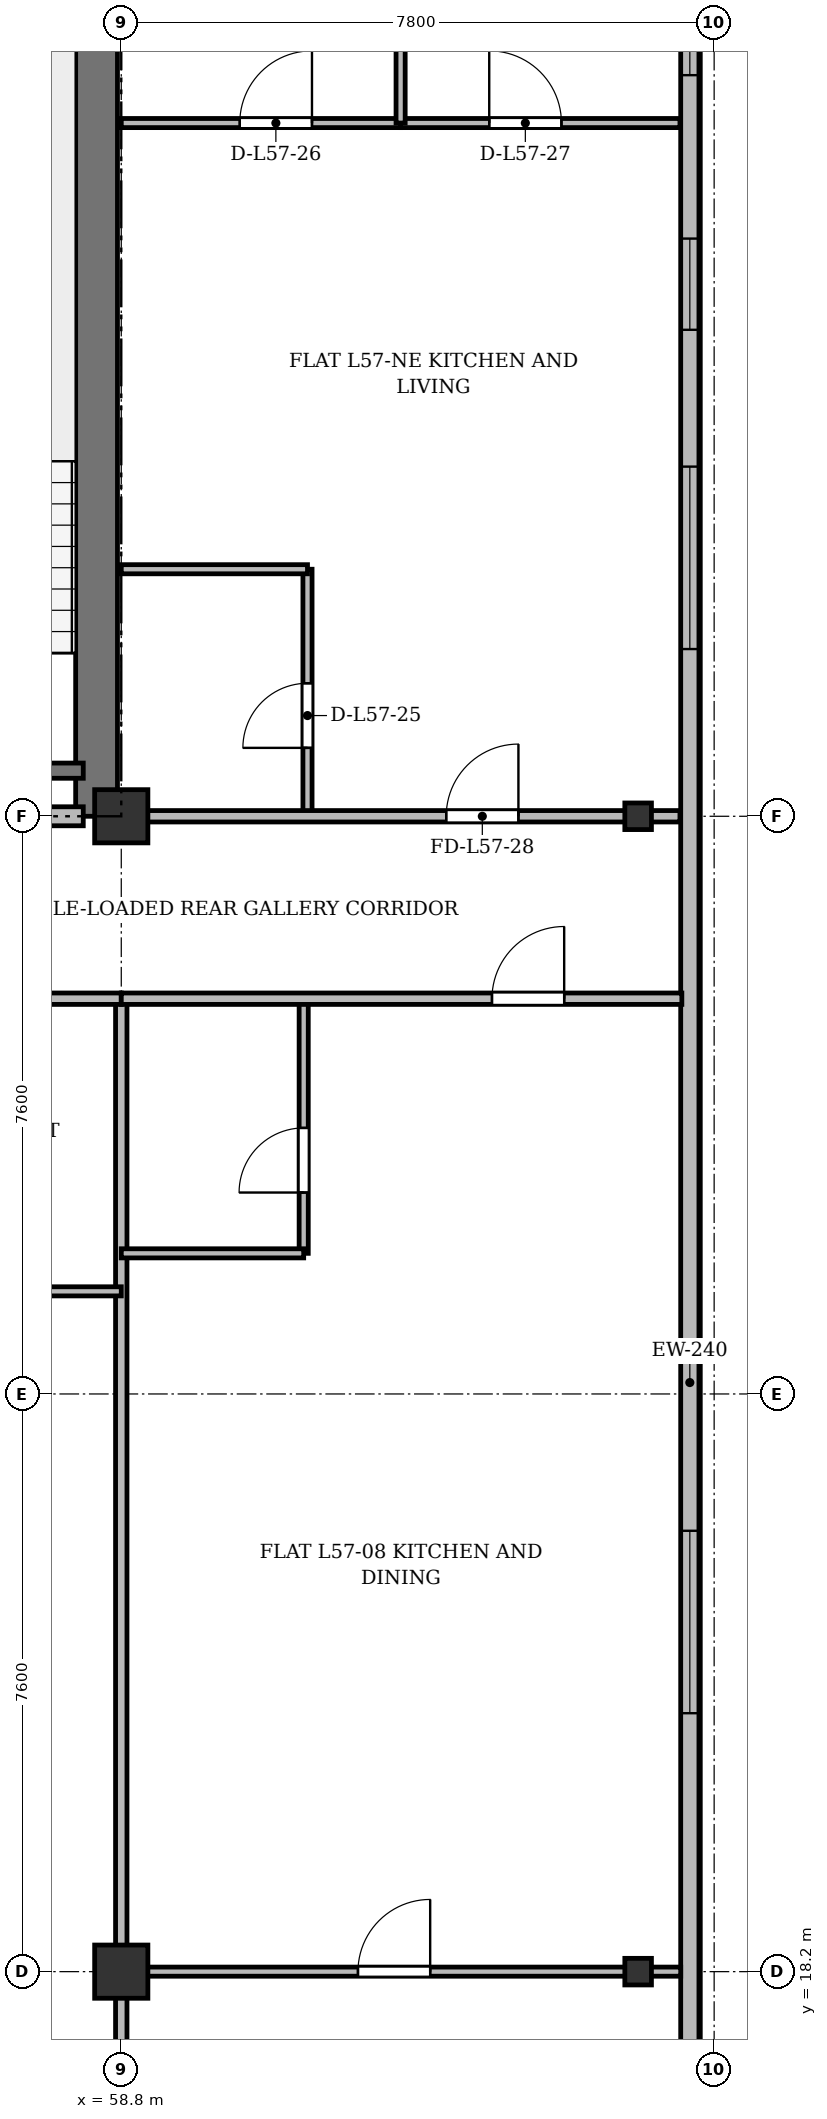
"""IFC4 building model, lengths in metres.
Left out: names, types, materials, properties, quantities, classifications, styles, units other than length and angle.
Written with IfcOpenShell. Run it as: python <this file> out.ifc"""

import sys

from ifc_helpers import new_model, si_unit, direction, frame, frame_2d, origin, origin_2d, place, context, subcontext, project, spatial, rectangle, i_section, extrude, source, transform, mapped, element, fill, save


model = new_model("IFC4")
c1 = context("Model", 3, precision=1e-05, world=origin(), true_north=direction((0.0, 1.0)))
c2 = subcontext(c1, "Body", "Model", "MODEL_VIEW")
j1 = project(units=[si_unit("LENGTHUNIT", "METRE"), si_unit("PLANEANGLEUNIT", "RADIAN")], contexts=[c1])
p1 = place(None, origin())
s1 = spatial("IfcSite", under=j1, at=p1, CompositionType="ELEMENT")
p2 = place(p1, origin())
s2 = spatial("IfcBuilding", under=s1, at=p2, CompositionType="ELEMENT")
p3 = place(p2, frame((0.0, 0.0, 219.3)))
s3 = spatial("IfcBuildingStorey", under=s2, at=p3, CompositionType="ELEMENT", Elevation=219.3)
m1 = source(origin(), c2, "Body", "SweptSolid", [
    extrude(rectangle(XDim=0.7, YDim=0.7, at=origin_2d()), origin(), (0.0, 0.0, 1.0), 3.6),
])
for number, where, z_axis, x_axis in (
    (1, (58.8, 18.2, 0.0), (0.0, 0.0, 1.0), (1.0, 0.0, 0.0)),
    (2, (58.8, 33.4, 0.0), (0.0, 0.0, 1.0), (1.0, 0.0, 0.0)),
):
    element("IfcColumn", number, at=place(p3, frame(where, z_axis=z_axis, x_axis=x_axis)), inside=s3, PredefinedType="COLUMN", context=c2, shape_type="MappedRepresentation", body=[
        mapped(m1, transform((0.0, 0.0, 0.0), x_axis=(1.0, 0.0, 0.0), y_axis=(0.0, 1.0, 0.0), z_axis=(0.0, 0.0, 1.0), scale=1.0)),
    ])
m2 = source(origin(), c2, "Body", "SweptSolid", [
    extrude(i_section(OverallWidth=0.35, OverallDepth=0.35, WebThickness=0.018, FlangeThickness=0.028, at=origin_2d()), origin(), (0.0, 0.0, 1.0), 3.6),
])
for number, where, z_axis, x_axis in (
    (3, (65.6, 18.2, 0.0), (0.0, 0.0, 1.0), (1.0, 0.0, 0.0)),
    (4, (65.6, 33.4, 0.0), (0.0, 0.0, 1.0), (1.0, 0.0, 0.0)),
):
    element("IfcColumn", number, at=place(p3, frame(where, z_axis=z_axis, x_axis=x_axis)), inside=s3, PredefinedType="COLUMN", context=c2, shape_type="MappedRepresentation", body=[
        mapped(m2, transform((0.0, 0.0, 0.0), x_axis=(1.0, 0.0, 0.0), y_axis=(0.0, 1.0, 0.0), z_axis=(0.0, 0.0, 1.0), scale=1.0)),
    ])
p4 = place(p3, frame((66.28, 45.5, 0.0), z_axis=(0.0, 0.0, 1.0), x_axis=(0.0, -1.0, 0.0)))
e5 = element("IfcWall", 5, at=p4, inside=s3, PredefinedType="SOLIDWALL", context=c2, shape_type="SweptSolid", body=[
    extrude(rectangle(XDim=39.1, YDim=0.24, at=frame_2d((19.55, 0.0))), origin(), (0.0, 0.0, 1.0), 3.36),
])
p5 = place(p4, frame((36.45, 0.0, 0.92)))
e6 = element("IfcOpeningElement", 6, at=p5, cuts=e5, PredefinedType="OPENING", context=c2, shape_type="SweptSolid", body=[
    extrude(rectangle(XDim=1.2, YDim=1.65, at=frame_2d((0.6, 0.825))), frame((0.0, 0.13, 0.0), z_axis=(0.0, -1.0, 0.0), x_axis=(1.0, 0.0, 0.0)), (0.0, 0.0, 1.0), 0.26),
])
p6 = place(p4, frame((32.9, 0.0, 0.92)))
e7 = element("IfcOpeningElement", 7, at=p6, cuts=e5, PredefinedType="OPENING", context=c2, shape_type="SweptSolid", body=[
    extrude(rectangle(XDim=2.4, YDim=2.1, at=frame_2d((1.2, 1.05))), frame((0.0, 0.13, 0.0), z_axis=(0.0, -1.0, 0.0), x_axis=(1.0, 0.0, 0.0)), (0.0, 0.0, 1.0), 0.26),
])
p7 = place(p4, frame((28.7, 0.0, 0.92)))
e8 = element("IfcOpeningElement", 8, at=p7, cuts=e5, PredefinedType="OPENING", context=c2, shape_type="SweptSolid", body=[
    extrude(rectangle(XDim=2.4, YDim=2.1, at=frame_2d((1.2, 1.05))), frame((0.0, 0.13, 0.0), z_axis=(0.0, -1.0, 0.0), x_axis=(1.0, 0.0, 0.0)), (0.0, 0.0, 1.0), 0.26),
])
p8 = place(p4, frame((21.5, 0.0, 0.92)))
e9 = element("IfcOpeningElement", 9, at=p8, cuts=e5, PredefinedType="OPENING", context=c2, shape_type="SweptSolid", body=[
    extrude(rectangle(XDim=2.4, YDim=2.1, at=frame_2d((1.2, 1.05))), frame((0.0, 0.13, 0.0), z_axis=(0.0, -1.0, 0.0), x_axis=(1.0, 0.0, 0.0)), (0.0, 0.0, 1.0), 0.26),
])
p9 = place(p4, frame((7.5, 0.0, 0.92)))
e10 = element("IfcOpeningElement", 10, at=p9, cuts=e5, PredefinedType="OPENING", context=c2, shape_type="SweptSolid", body=[
    extrude(rectangle(XDim=2.4, YDim=2.1, at=frame_2d((1.2, 1.05))), frame((0.0, 0.13, 0.0), z_axis=(0.0, -1.0, 0.0), x_axis=(1.0, 0.0, 0.0)), (0.0, 0.0, 1.0), 0.26),
])
p10 = place(p4, frame((4.5, 0.0, 0.92)))
e11 = element("IfcOpeningElement", 11, at=p10, cuts=e5, PredefinedType="OPENING", context=c2, shape_type="SweptSolid", body=[
    extrude(rectangle(XDim=1.2, YDim=1.65, at=frame_2d((0.6, 0.825))), frame((0.0, 0.13, 0.0), z_axis=(0.0, -1.0, 0.0), x_axis=(1.0, 0.0, 0.0)), (0.0, 0.0, 1.0), 0.26),
])
p11 = place(p4, frame((1.15, 0.0, 0.92)))
e12 = element("IfcOpeningElement", 12, at=p11, cuts=e5, PredefinedType="OPENING", context=c2, shape_type="SweptSolid", body=[
    extrude(rectangle(XDim=1.2, YDim=1.65, at=frame_2d((0.6, 0.825))), frame((0.0, 0.13, 0.0), z_axis=(0.0, -1.0, 0.0), x_axis=(1.0, 0.0, 0.0)), (0.0, 0.0, 1.0), 0.26),
])
p12 = place(p3, frame((58.475, 33.4, 0.0), z_axis=(0.0, 0.0, 1.0), x_axis=(0.0, 1.0, 0.0)))
e13 = element("IfcWall", 13, at=p12, inside=s3, PredefinedType="SHEAR", context=c2, shape_type="SweptSolid", body=[
    extrude(rectangle(XDim=11.55, YDim=0.55, at=frame_2d((5.775, 0.0))), origin(), (0.0, 0.0, 1.0), 3.36),
])
p13 = place(p3, frame((54.9, 34.0, 0.0), z_axis=(0.0, 0.0, 1.0), x_axis=(1.0, 0.0, 0.0)))
e14 = element("IfcWall", 14, at=p13, inside=s3, PredefinedType="SHEAR", context=c2, shape_type="SweptSolid", body=[
    extrude(rectangle(XDim=3.4, YDim=0.2, at=frame_2d((1.7, 0.0))), origin(), (0.0, 0.0, 1.0), 3.36),
])
p14 = place(p3, frame((47.15, 33.4, 0.0), z_axis=(0.0, 0.0, 1.0), x_axis=(1.0, 0.0, 0.0)))
e15 = element("IfcWall", 15, at=p14, inside=s3, PredefinedType="PARTITIONING", context=c2, shape_type="SweptSolid", body=[
    extrude(rectangle(XDim=11.15, YDim=0.25, at=frame_2d((5.575, 0.0))), origin(), (0.0, 0.0, 1.0), 2.91),
])
p15 = place(p14, frame((0.7, 0.0, 0.0)))
e16 = element("IfcOpeningElement", 16, at=p15, cuts=e15, PredefinedType="OPENING", context=c2, shape_type="SweptSolid", body=[
    extrude(rectangle(XDim=0.95, YDim=2.15, at=frame_2d((0.475, 1.075))), frame((0.0, 0.135, 0.0), z_axis=(0.0, -1.0, 0.0), x_axis=(1.0, 0.0, 0.0)), (0.0, 0.0, 1.0), 0.27),
])
p16 = place(p14, frame((6.0, 0.0, 0.0)))
e17 = element("IfcOpeningElement", 17, at=p16, cuts=e15, PredefinedType="OPENING", context=c2, shape_type="SweptSolid", body=[
    extrude(rectangle(XDim=1.2, YDim=2.15, at=frame_2d((0.6, 1.075))), frame((0.0, 0.135, 0.0), z_axis=(0.0, -1.0, 0.0), x_axis=(1.0, 0.0, 0.0)), (0.0, 0.0, 1.0), 0.27),
])
p17 = place(p3, frame((61.25, 33.4, 0.0), z_axis=(0.0, 0.0, 1.0), x_axis=(0.0, 1.0, 0.0)))
e18 = element("IfcWall", 18, at=p17, inside=s3, PredefinedType="PARTITIONING", context=c2, shape_type="SweptSolid", body=[
    extrude(rectangle(XDim=3.25, YDim=0.12, at=frame_2d((1.625, 0.0))), origin(), (0.0, 0.0, 1.0), 2.91),
])
p18 = place(p17, frame((0.9, 0.0, 0.0)))
e19 = element("IfcOpeningElement", 19, at=p18, cuts=e18, PredefinedType="OPENING", context=c2, shape_type="SweptSolid", body=[
    extrude(rectangle(XDim=0.85, YDim=2.1, at=frame_2d((0.425, 1.05))), frame((0.0, 0.07, 0.0), z_axis=(0.0, -1.0, 0.0), x_axis=(1.0, 0.0, 0.0)), (0.0, 0.0, 1.0), 0.14),
])
p19 = place(p3, frame((58.8, 36.65, 0.0), z_axis=(0.0, 0.0, 1.0), x_axis=(1.0, 0.0, 0.0)))
e20 = element("IfcWall", 20, at=p19, inside=s3, PredefinedType="PARTITIONING", context=c2, shape_type="SweptSolid", body=[
    extrude(rectangle(XDim=2.45, YDim=0.12, at=frame_2d((1.225, 0.0))), origin(), (0.0, 0.0, 1.0), 2.86),
])
p20 = place(p3, frame((58.8, 42.52, 0.0), z_axis=(0.0, 0.0, 1.0), x_axis=(1.0, 0.0, 0.0)))
e21 = element("IfcWall", 21, at=p20, inside=s3, PredefinedType="PARTITIONING", context=c2, shape_type="SweptSolid", body=[
    extrude(rectangle(XDim=3.675, YDim=0.12, at=frame_2d((1.837, 0.0))), origin(), (0.0, 0.0, 1.0), 2.86),
])
p21 = place(p20, frame((1.559, 0.0, 0.0)))
e22 = element("IfcOpeningElement", 22, at=p21, cuts=e21, PredefinedType="OPENING", context=c2, shape_type="SweptSolid", body=[
    extrude(rectangle(XDim=0.95, YDim=2.15, at=frame_2d((0.475, 1.075))), frame((0.0, 0.07, 0.0), z_axis=(0.0, -1.0, 0.0), x_axis=(1.0, 0.0, 0.0)), (0.0, 0.0, 1.0), 0.14),
])
p22 = place(p3, frame((62.475, 42.52, 0.0), z_axis=(0.0, 0.0, 1.0), x_axis=(1.0, 0.0, 0.0)))
e23 = element("IfcWall", 23, at=p22, inside=s3, PredefinedType="PARTITIONING", context=c2, shape_type="SweptSolid", body=[
    extrude(rectangle(XDim=3.675, YDim=0.12, at=frame_2d((1.837, 0.0))), origin(), (0.0, 0.0, 1.0), 2.86),
])
p23 = place(p22, frame((1.166, 0.0, 0.0)))
e24 = element("IfcOpeningElement", 24, at=p23, cuts=e23, PredefinedType="OPENING", context=c2, shape_type="SweptSolid", body=[
    extrude(rectangle(XDim=0.95, YDim=2.15, at=frame_2d((0.475, 1.075))), frame((0.0, 0.07, 0.0), z_axis=(0.0, -1.0, 0.0), x_axis=(1.0, 0.0, 0.0)), (0.0, 0.0, 1.0), 0.14),
])
p24 = place(p3, frame((62.475, 42.52, 0.0), z_axis=(0.0, 0.0, 1.0), x_axis=(0.0, 1.0, 0.0)))
e25 = element("IfcWall", 25, at=p24, inside=s3, PredefinedType="PARTITIONING", context=c2, shape_type="SweptSolid", body=[
    extrude(rectangle(XDim=5.74, YDim=0.12, at=frame_2d((2.87, 0.0))), origin(), (0.0, 0.0, 1.0), 2.91),
])
p25 = place(p3, frame((58.8, 33.4, 0.0), z_axis=(0.0, 0.0, 1.0), x_axis=(1.0, 0.0, 0.0)))
e26 = element("IfcWall", 26, at=p25, inside=s3, PredefinedType="PARTITIONING", context=c2, shape_type="SweptSolid", body=[
    extrude(rectangle(XDim=7.35, YDim=0.15, at=frame_2d((3.675, 0.0))), origin(), (0.0, 0.0, 1.0), 2.91),
])
p26 = place(p25, frame((4.275, 0.0, 0.0)))
e27 = element("IfcOpeningElement", 27, at=p26, cuts=e26, PredefinedType="OPENING", context=c2, shape_type="SweptSolid", body=[
    extrude(rectangle(XDim=0.95, YDim=2.15, at=frame_2d((0.475, 1.075))), frame((0.0, 0.085, 0.0), z_axis=(0.0, -1.0, 0.0), x_axis=(1.0, 0.0, 0.0)), (0.0, 0.0, 1.0), 0.17),
])
p27 = place(p3, frame((58.8, 3.625, 0.0), z_axis=(0.0, 0.0, 1.0), x_axis=(0.0, 1.0, 0.0)))
e28 = element("IfcWall", 28, at=p27, inside=s3, PredefinedType="PARTITIONING", context=c2, shape_type="SweptSolid", body=[
    extrude(rectangle(XDim=27.375, YDim=0.15, at=frame_2d((13.688, 0.0))), origin(), (0.0, 0.0, 1.0), 2.86),
])
p28 = place(p3, frame((51.0, 31.0, 0.0), z_axis=(0.0, 0.0, 1.0), x_axis=(1.0, 0.0, 0.0)))
e29 = element("IfcWall", 29, at=p28, inside=s3, PredefinedType="PARTITIONING", context=c2, shape_type="SweptSolid", body=[
    extrude(rectangle(XDim=7.8, YDim=0.15, at=frame_2d((3.9, 0.0))), origin(), (0.0, 0.0, 1.0), 2.86),
])
p29 = place(p28, frame((3.333, 0.0, 0.0)))
e30 = element("IfcOpeningElement", 30, at=p29, cuts=e29, PredefinedType="OPENING", context=c2, shape_type="SweptSolid", body=[
    extrude(rectangle(XDim=0.95, YDim=2.15, at=frame_2d((0.475, 1.075))), frame((0.0, 0.085, 0.0), z_axis=(0.0, -1.0, 0.0), x_axis=(1.0, 0.0, 0.0)), (0.0, 0.0, 1.0), 0.17),
])
p30 = place(p3, frame((51.0, 27.15, 0.0), z_axis=(0.0, 0.0, 1.0), x_axis=(1.0, 0.0, 0.0)))
e31 = element("IfcWall", 31, at=p30, inside=s3, PredefinedType="PARTITIONING", context=c2, shape_type="SweptSolid", body=[
    extrude(rectangle(XDim=7.8, YDim=0.12, at=frame_2d((3.9, 0.0))), origin(), (0.0, 0.0, 1.0), 2.86),
])
p31 = place(p30, frame((3.333, 0.0, 0.0)))
e32 = element("IfcOpeningElement", 32, at=p31, cuts=e31, PredefinedType="OPENING", context=c2, shape_type="SweptSolid", body=[
    extrude(rectangle(XDim=0.95, YDim=2.15, at=frame_2d((0.475, 1.075))), frame((0.0, 0.07, 0.0), z_axis=(0.0, -1.0, 0.0), x_axis=(1.0, 0.0, 0.0)), (0.0, 0.0, 1.0), 0.14),
])
p32 = place(p3, frame((58.8, 18.2, 0.0), z_axis=(0.0, 0.0, 1.0), x_axis=(1.0, 0.0, 0.0)))
e33 = element("IfcWall", 33, at=p32, inside=s3, PredefinedType="PARTITIONING", context=c2, shape_type="SweptSolid", body=[
    extrude(rectangle(XDim=7.36, YDim=0.12, at=frame_2d((3.68, 0.0))), origin(), (0.0, 0.0, 1.0), 2.91),
])
p33 = place(p32, frame((3.114, 0.0, 0.0)))
e34 = element("IfcOpeningElement", 34, at=p33, cuts=e33, PredefinedType="OPENING", context=c2, shape_type="SweptSolid", body=[
    extrude(rectangle(XDim=0.95, YDim=2.15, at=frame_2d((0.475, 1.075))), frame((0.0, 0.07, 0.0), z_axis=(0.0, -1.0, 0.0), x_axis=(1.0, 0.0, 0.0)), (0.0, 0.0, 1.0), 0.14),
])
p34 = place(p3, frame((61.2, 27.65, 0.0), z_axis=(0.0, 0.0, 1.0), x_axis=(0.0, 1.0, 0.0)))
e35 = element("IfcWall", 35, at=p34, inside=s3, PredefinedType="PARTITIONING", context=c2, shape_type="SweptSolid", body=[
    extrude(rectangle(XDim=3.35, YDim=0.12, at=frame_2d((1.675, 0.0))), origin(), (0.0, 0.0, 1.0), 3.36),
])
p35 = place(p34, frame((0.8, 0.0, 0.0)))
e36 = element("IfcOpeningElement", 36, at=p35, cuts=e35, PredefinedType="OPENING", context=c2, shape_type="SweptSolid", body=[
    extrude(rectangle(XDim=0.85, YDim=2.1, at=frame_2d((0.425, 1.05))), frame((0.0, 0.07, 0.0), z_axis=(0.0, -1.0, 0.0), x_axis=(1.0, 0.0, 0.0)), (0.0, 0.0, 1.0), 0.14),
])
p36 = place(p3, frame((58.8, 27.65, 0.0), z_axis=(0.0, 0.0, 1.0), x_axis=(1.0, 0.0, 0.0)))
e37 = element("IfcWall", 37, at=p36, inside=s3, PredefinedType="PARTITIONING", context=c2, shape_type="SweptSolid", body=[
    extrude(rectangle(XDim=2.4, YDim=0.12, at=frame_2d((1.2, 0.0))), origin(), (0.0, 0.0, 1.0), 2.86),
])
p37 = place(p3, frame((58.8, 31.0, 0.0), z_axis=(0.0, 0.0, 1.0), x_axis=(1.0, 0.0, 0.0)))
e38 = element("IfcWall", 38, at=p37, inside=s3, PredefinedType="PARTITIONING", context=c2, shape_type="SweptSolid", body=[
    extrude(rectangle(XDim=7.375, YDim=0.15, at=frame_2d((3.688, 0.0))), origin(), (0.0, 0.0, 1.0), 2.86),
])
p38 = place(p37, frame((4.877, 0.0, 0.0)))
e39 = element("IfcOpeningElement", 39, at=p38, cuts=e38, PredefinedType="OPENING", context=c2, shape_type="SweptSolid", body=[
    extrude(rectangle(XDim=0.95, YDim=2.15, at=frame_2d((0.475, 1.075))), frame((0.0, 0.085, 0.0), z_axis=(0.0, -1.0, 0.0), x_axis=(1.0, 0.0, 0.0)), (0.0, 0.0, 1.0), 0.17),
])
m3 = source(origin(), c2, "Body", "SweptSolid", [
    extrude(rectangle(XDim=2.4, YDim=2.1, at=frame_2d((1.2, 1.05))), frame((0.0, 0.03, 0.0), z_axis=(0.0, -1.0, 0.0), x_axis=(1.0, 0.0, 0.0)), (0.0, 0.0, 1.0), 0.06),
])
p39 = place(p8, origin())
e40 = element("IfcWindow", 40, at=p39, inside=s3, PartitioningType="SINGLE_PANEL", PredefinedType="WINDOW", context=c2, shape_type="MappedRepresentation", body=[
    mapped(m3, transform((0.0, 0.0, 0.0), x_axis=(1.0, 0.0, 0.0), y_axis=(0.0, 1.0, 0.0), z_axis=(0.0, 0.0, 1.0), scale=1.0)),
])
fill(e9, e40)
p40 = place(p9, origin())
e41 = element("IfcWindow", 41, at=p40, inside=s3, PartitioningType="SINGLE_PANEL", PredefinedType="WINDOW", context=c2, shape_type="MappedRepresentation", body=[
    mapped(m3, transform((0.0, 0.0, 0.0), x_axis=(1.0, 0.0, 0.0), y_axis=(0.0, 1.0, 0.0), z_axis=(0.0, 0.0, 1.0), scale=1.0)),
])
fill(e10, e41)
m4 = source(origin(), c2, "Body", "SweptSolid", [
    extrude(rectangle(XDim=1.2, YDim=1.65, at=frame_2d((0.6, 0.825))), frame((0.0, 0.03, 0.0), z_axis=(0.0, -1.0, 0.0), x_axis=(1.0, 0.0, 0.0)), (0.0, 0.0, 1.0), 0.06),
])
p41 = place(p10, origin())
e42 = element("IfcWindow", 42, at=p41, inside=s3, PartitioningType="SINGLE_PANEL", PredefinedType="WINDOW", context=c2, shape_type="MappedRepresentation", body=[
    mapped(m4, transform((0.0, 0.0, 0.0), x_axis=(1.0, 0.0, 0.0), y_axis=(0.0, 1.0, 0.0), z_axis=(0.0, 0.0, 1.0), scale=1.0)),
])
fill(e11, e42)
p42 = place(p11, origin())
e43 = element("IfcWindow", 43, at=p42, inside=s3, PartitioningType="SINGLE_PANEL", PredefinedType="WINDOW", context=c2, shape_type="MappedRepresentation", body=[
    mapped(m4, transform((0.0, 0.0, 0.0), x_axis=(1.0, 0.0, 0.0), y_axis=(0.0, 1.0, 0.0), z_axis=(0.0, 0.0, 1.0), scale=1.0)),
])
fill(e12, e43)
m5 = source(origin(), c2, "Body", "SweptSolid", [
    extrude(rectangle(XDim=0.85, YDim=2.1, at=frame_2d((0.425, 1.05))), frame((0.0, 0.025, 0.0), z_axis=(0.0, -1.0, 0.0), x_axis=(1.0, 0.0, 0.0)), (0.0, 0.0, 1.0), 0.05),
])
p43 = place(p18, origin())
e44 = element("IfcDoor", 44, at=p43, inside=s3, OperationType="SINGLE_SWING_LEFT", PredefinedType="DOOR", context=c2, shape_type="MappedRepresentation", body=[
    mapped(m5, transform((0.0, 0.0, 0.0), x_axis=(1.0, 0.0, 0.0), y_axis=(0.0, 1.0, 0.0), z_axis=(0.0, 0.0, 1.0), scale=1.0)),
])
fill(e19, e44)
m6 = source(origin(), c2, "Body", "SweptSolid", [
    extrude(rectangle(XDim=0.95, YDim=2.15, at=frame_2d((0.475, 1.075))), frame((0.0, 0.025, 0.0), z_axis=(0.0, -1.0, 0.0), x_axis=(1.0, 0.0, 0.0)), (0.0, 0.0, 1.0), 0.05),
])
p44 = place(p21, origin())
e45 = element("IfcDoor", 45, at=p44, inside=s3, OperationType="SINGLE_SWING_RIGHT", PredefinedType="DOOR", context=c2, shape_type="MappedRepresentation", body=[
    mapped(m6, transform((0.0, 0.0, 0.0), x_axis=(1.0, 0.0, 0.0), y_axis=(0.0, 1.0, 0.0), z_axis=(0.0, 0.0, 1.0), scale=1.0)),
])
fill(e22, e45)
p45 = place(p23, origin())
e46 = element("IfcDoor", 46, at=p45, inside=s3, OperationType="SINGLE_SWING_LEFT", PredefinedType="DOOR", context=c2, shape_type="MappedRepresentation", body=[
    mapped(m6, transform((0.0, 0.0, 0.0), x_axis=(1.0, 0.0, 0.0), y_axis=(0.0, 1.0, 0.0), z_axis=(0.0, 0.0, 1.0), scale=1.0)),
])
fill(e24, e46)
p46 = place(p26, origin())
e47 = element("IfcDoor", 47, at=p46, inside=s3, OperationType="SINGLE_SWING_RIGHT", PredefinedType="DOOR", context=c2, shape_type="MappedRepresentation", body=[
    mapped(m6, transform((0.0, 0.0, 0.0), x_axis=(1.0, 0.0, 0.0), y_axis=(0.0, 1.0, 0.0), z_axis=(0.0, 0.0, 1.0), scale=1.0)),
])
fill(e27, e47)
p47 = place(p33, origin())
e48 = element("IfcDoor", 48, at=p47, inside=s3, OperationType="SINGLE_SWING_RIGHT", PredefinedType="DOOR", context=c2, shape_type="MappedRepresentation", body=[
    mapped(m6, transform((0.0, 0.0, 0.0), x_axis=(1.0, 0.0, 0.0), y_axis=(0.0, 1.0, 0.0), z_axis=(0.0, 0.0, 1.0), scale=1.0)),
])
fill(e34, e48)
p48 = place(p35, origin())
e49 = element("IfcDoor", 49, at=p48, inside=s3, OperationType="SINGLE_SWING_LEFT", PredefinedType="DOOR", context=c2, shape_type="MappedRepresentation", body=[
    mapped(m5, transform((0.0, 0.0, 0.0), x_axis=(1.0, 0.0, 0.0), y_axis=(0.0, 1.0, 0.0), z_axis=(0.0, 0.0, 1.0), scale=1.0)),
])
fill(e36, e49)
p49 = place(p38, origin())
e50 = element("IfcDoor", 50, at=p49, inside=s3, OperationType="SINGLE_SWING_RIGHT", PredefinedType="DOOR", context=c2, shape_type="MappedRepresentation", body=[
    mapped(m6, transform((0.0, 0.0, 0.0), x_axis=(1.0, 0.0, 0.0), y_axis=(0.0, 1.0, 0.0), z_axis=(0.0, 0.0, 1.0), scale=1.0)),
])
fill(e39, e50)
save(model, sys.argv[1])
